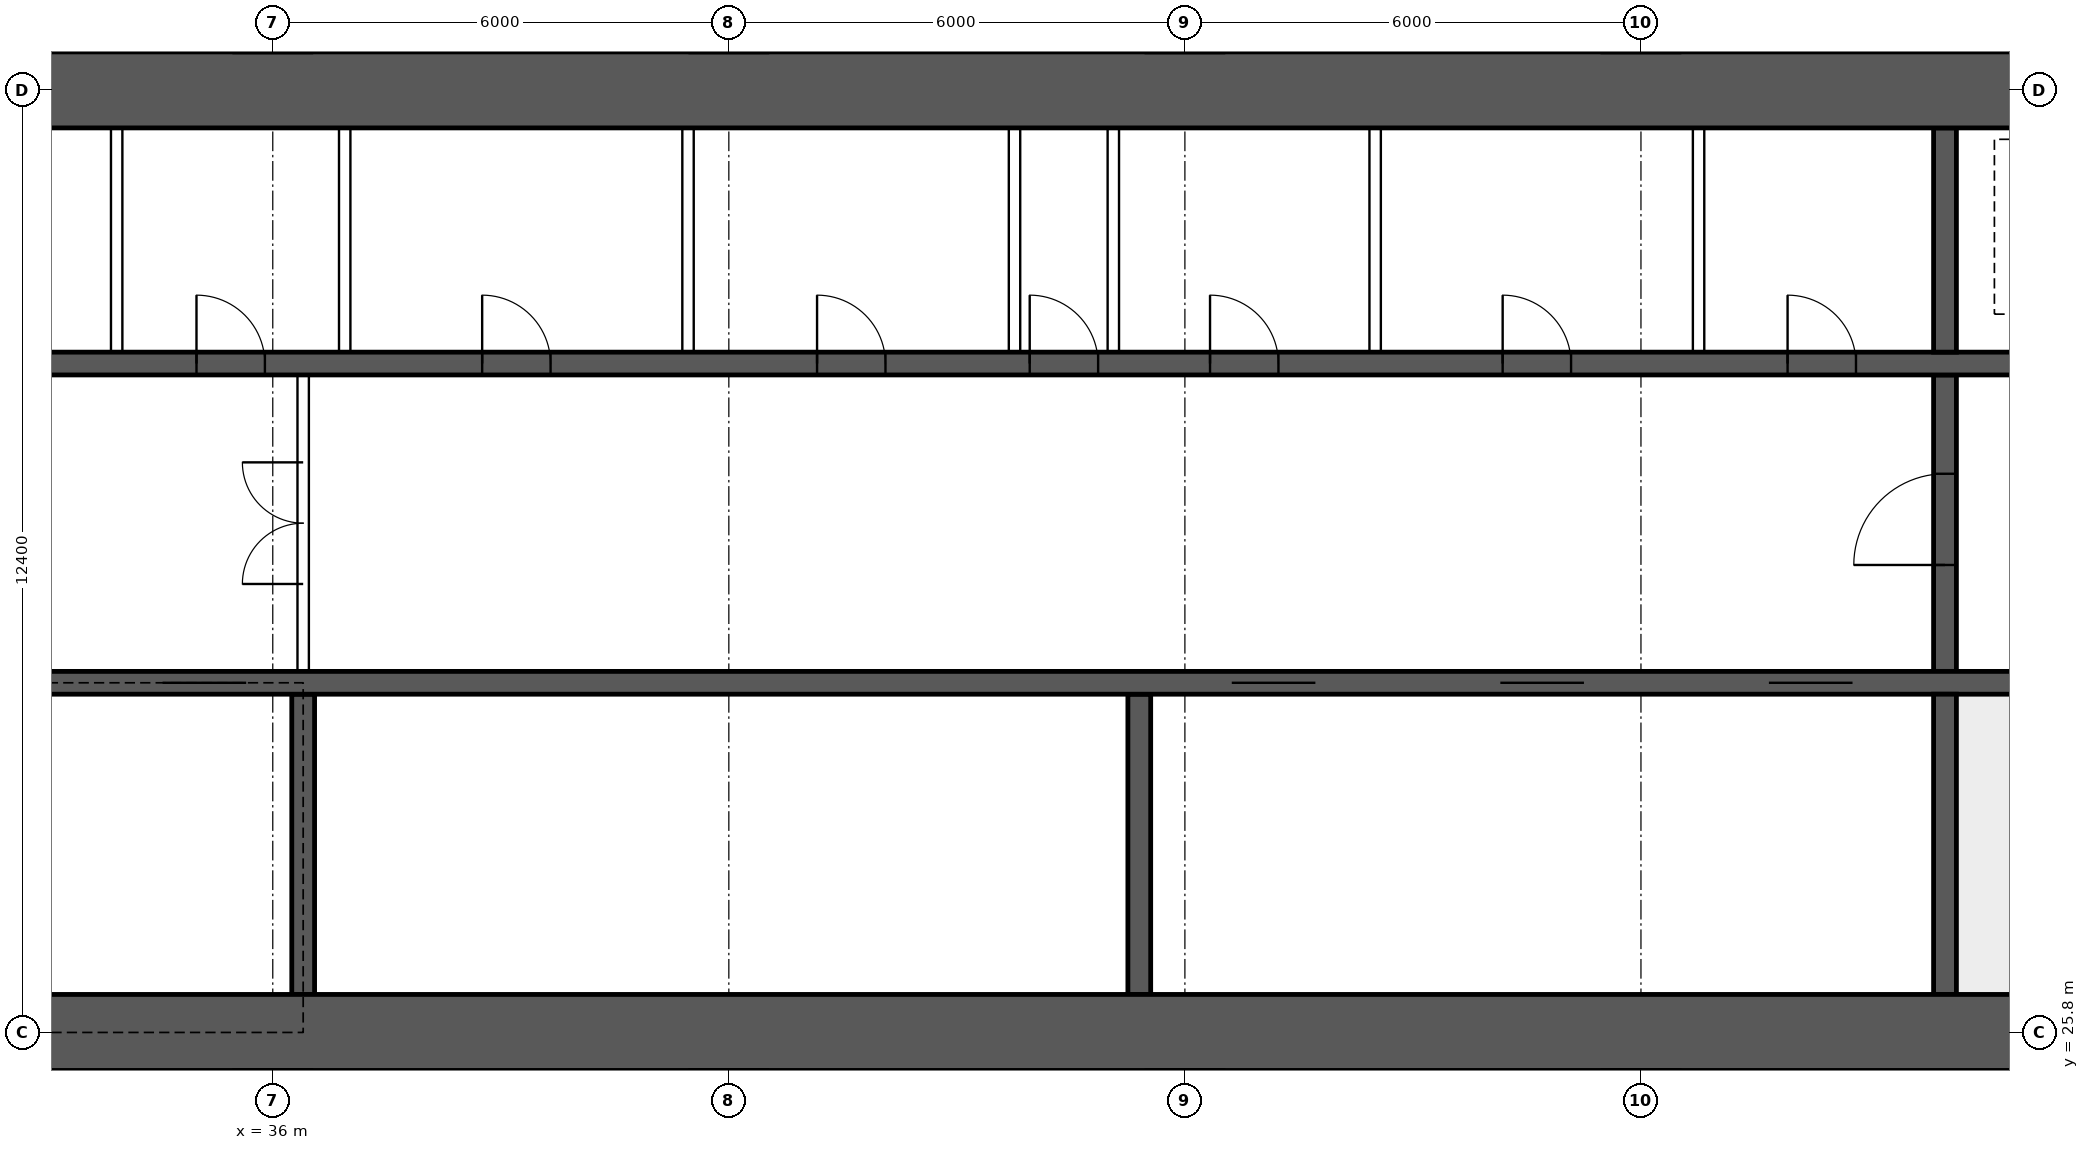
"""IFC4 building model, lengths in metres.
Left out: names, types, materials, properties, quantities, classifications, styles, units other than length and angle.
Written with IfcOpenShell. Run it as: python <this file> out.ifc"""

import sys

from ifc_helpers import new_model, si_unit, direction, frame, frame_2d, origin, place, context, subcontext, project, spatial, rectangle, extrude, element, fill, save


model = new_model("IFC4")
c1 = context("Model", 3, precision=1e-05, world=origin(), true_north=direction((0.0, 1.0)))
c2 = subcontext(c1, "Body", "Model", "MODEL_VIEW")
j1 = project(units=[si_unit("LENGTHUNIT", "METRE"), si_unit("PLANEANGLEUNIT", "RADIAN")], contexts=[c1])
p1 = place(None, origin())
s1 = spatial("IfcSite", under=j1, at=p1, CompositionType="ELEMENT")
p2 = place(p1, origin())
s2 = spatial("IfcBuilding", under=s1, at=p2, CompositionType="ELEMENT")
p3 = place(p2, frame((0.0, 0.0, 65.2)))
s3 = spatial("IfcBuildingStorey", under=s2, at=p3, CompositionType="ELEMENT", Elevation=65.2)
for number, where, z_axis, x_axis in (
    (1, (18.0, 25.8, 0.0), (0.0, 0.0, 1.0), (1.0, 0.0, 0.0)),
    (2, (18.0, 38.2, 0.0), (0.0, 0.0, 1.0), (1.0, 0.0, 0.0)),
):
    element("IfcWall", number, at=place(p3, frame(where, z_axis=z_axis, x_axis=x_axis)), inside=s3, PredefinedType="SHEAR", context=c2, shape_type="SweptSolid", body=[
        extrude(rectangle(XDim=48.0, YDim=1.0, at=frame_2d((24.0, 0.0))), origin(), (0.0, 0.0, 1.0), 3.75),
    ])
p4 = place(p3, frame((18.5, 30.4, 0.0), z_axis=(0.0, 0.0, 1.0), x_axis=(1.0, 0.0, 0.0)))
e3 = element("IfcWall", 3, at=p4, inside=s3, PredefinedType="SHEAR", context=c2, shape_type="SweptSolid", body=[
    extrude(rectangle(XDim=47.0, YDim=0.3, at=frame_2d((23.5, 0.0))), origin(), (0.0, 0.0, 1.0), 3.75),
])
p5 = place(p4, frame((0.4, 0.0, 0.0)))
e4 = element("IfcOpeningElement", 4, at=p5, cuts=e3, PredefinedType="OPENING", context=c2, shape_type="SweptSolid", body=[
    extrude(rectangle(XDim=1.0, YDim=2.1, at=frame_2d((0.5, 1.05))), frame((0.0, 0.16, 0.0), z_axis=(0.0, -1.0, 0.0), x_axis=(1.0, 0.0, 0.0)), (0.0, 0.0, 1.0), 0.32),
])
p6 = place(p4, frame((45.6, 0.0, 0.0)))
e5 = element("IfcOpeningElement", 5, at=p6, cuts=e3, PredefinedType="OPENING", context=c2, shape_type="SweptSolid", body=[
    extrude(rectangle(XDim=1.0, YDim=2.1, at=frame_2d((0.5, 1.05))), frame((0.0, 0.16, 0.0), z_axis=(0.0, -1.0, 0.0), x_axis=(1.0, 0.0, 0.0)), (0.0, 0.0, 1.0), 0.32),
])
p7 = place(p4, frame((8.25, 0.0, 0.0)))
e6 = element("IfcOpeningElement", 6, at=p7, cuts=e3, PredefinedType="OPENING", context=c2, shape_type="SweptSolid", body=[
    extrude(rectangle(XDim=1.1, YDim=2.1, at=frame_2d((0.55, 1.05))), frame((0.0, 0.16, 0.0), z_axis=(0.0, -1.0, 0.0), x_axis=(1.0, 0.0, 0.0)), (0.0, 0.0, 1.0), 0.32),
])
p8 = place(p4, frame((10.85, 0.0, 0.0)))
e7 = element("IfcOpeningElement", 7, at=p8, cuts=e3, PredefinedType="OPENING", context=c2, shape_type="SweptSolid", body=[
    extrude(rectangle(XDim=1.1, YDim=2.1, at=frame_2d((0.55, 1.05))), frame((0.0, 0.16, 0.0), z_axis=(0.0, -1.0, 0.0), x_axis=(1.0, 0.0, 0.0)), (0.0, 0.0, 1.0), 0.32),
])
p9 = place(p4, frame((13.45, 0.0, 0.0)))
e8 = element("IfcOpeningElement", 8, at=p9, cuts=e3, PredefinedType="OPENING", context=c2, shape_type="SweptSolid", body=[
    extrude(rectangle(XDim=1.1, YDim=2.1, at=frame_2d((0.55, 1.05))), frame((0.0, 0.16, 0.0), z_axis=(0.0, -1.0, 0.0), x_axis=(1.0, 0.0, 0.0)), (0.0, 0.0, 1.0), 0.32),
])
p10 = place(p4, frame((16.05, 0.0, 0.0)))
e9 = element("IfcOpeningElement", 9, at=p10, cuts=e3, PredefinedType="OPENING", context=c2, shape_type="SweptSolid", body=[
    extrude(rectangle(XDim=1.1, YDim=2.1, at=frame_2d((0.55, 1.05))), frame((0.0, 0.16, 0.0), z_axis=(0.0, -1.0, 0.0), x_axis=(1.0, 0.0, 0.0)), (0.0, 0.0, 1.0), 0.32),
])
p11 = place(p4, frame((30.117, 0.0, 0.0)))
e10 = element("IfcOpeningElement", 10, at=p11, cuts=e3, PredefinedType="OPENING", context=c2, shape_type="SweptSolid", body=[
    extrude(rectangle(XDim=1.1, YDim=2.1, at=frame_2d((0.55, 1.05))), frame((0.0, 0.16, 0.0), z_axis=(0.0, -1.0, 0.0), x_axis=(1.0, 0.0, 0.0)), (0.0, 0.0, 1.0), 0.32),
])
p12 = place(p4, frame((33.65, 0.0, 0.0)))
e11 = element("IfcOpeningElement", 11, at=p12, cuts=e3, PredefinedType="OPENING", context=c2, shape_type="SweptSolid", body=[
    extrude(rectangle(XDim=1.1, YDim=2.1, at=frame_2d((0.55, 1.05))), frame((0.0, 0.16, 0.0), z_axis=(0.0, -1.0, 0.0), x_axis=(1.0, 0.0, 0.0)), (0.0, 0.0, 1.0), 0.32),
])
p13 = place(p4, frame((37.183, 0.0, 0.0)))
e12 = element("IfcOpeningElement", 12, at=p13, cuts=e3, PredefinedType="OPENING", context=c2, shape_type="SweptSolid", body=[
    extrude(rectangle(XDim=1.1, YDim=2.1, at=frame_2d((0.55, 1.05))), frame((0.0, 0.16, 0.0), z_axis=(0.0, -1.0, 0.0), x_axis=(1.0, 0.0, 0.0)), (0.0, 0.0, 1.0), 0.32),
])
p14 = place(p3, frame((18.5, 34.6, 0.0), z_axis=(0.0, 0.0, 1.0), x_axis=(1.0, 0.0, 0.0)))
e13 = element("IfcWall", 13, at=p14, inside=s3, PredefinedType="SHEAR", context=c2, shape_type="SweptSolid", body=[
    extrude(rectangle(XDim=47.0, YDim=0.3, at=frame_2d((23.5, 0.0))), origin(), (0.0, 0.0, 1.0), 3.75),
])
p15 = place(p14, frame((0.9, 0.0, 0.0)))
e14 = element("IfcOpeningElement", 14, at=p15, cuts=e13, PredefinedType="OPENING", context=c2, shape_type="SweptSolid", body=[
    extrude(rectangle(XDim=1.1, YDim=2.1, at=frame_2d((0.55, 1.05))), frame((0.0, 0.16, 0.0), z_axis=(0.0, -1.0, 0.0), x_axis=(1.0, 0.0, 0.0)), (0.0, 0.0, 1.0), 0.32),
])
p16 = place(p14, frame((45.0, 0.0, 0.0)))
e15 = element("IfcOpeningElement", 15, at=p16, cuts=e13, PredefinedType="OPENING", context=c2, shape_type="SweptSolid", body=[
    extrude(rectangle(XDim=1.1, YDim=2.1, at=frame_2d((0.55, 1.05))), frame((0.0, 0.16, 0.0), z_axis=(0.0, -1.0, 0.0), x_axis=(1.0, 0.0, 0.0)), (0.0, 0.0, 1.0), 0.32),
])
p17 = place(p14, frame((4.1, 0.0, 0.0)))
e16 = element("IfcOpeningElement", 16, at=p17, cuts=e13, PredefinedType="OPENING", context=c2, shape_type="SweptSolid", body=[
    extrude(rectangle(XDim=0.9, YDim=2.1, at=frame_2d((0.45, 1.05))), frame((0.0, 0.16, 0.0), z_axis=(0.0, -1.0, 0.0), x_axis=(1.0, 0.0, 0.0)), (0.0, 0.0, 1.0), 0.32),
])
p18 = place(p14, frame((42.0, 0.0, 0.0)))
e17 = element("IfcOpeningElement", 17, at=p18, cuts=e13, PredefinedType="OPENING", context=c2, shape_type="SweptSolid", body=[
    extrude(rectangle(XDim=0.9, YDim=2.1, at=frame_2d((0.45, 1.05))), frame((0.0, 0.16, 0.0), z_axis=(0.0, -1.0, 0.0), x_axis=(1.0, 0.0, 0.0)), (0.0, 0.0, 1.0), 0.32),
])
p19 = place(p14, frame((8.875, 0.0, 0.0)))
e18 = element("IfcOpeningElement", 18, at=p19, cuts=e13, PredefinedType="OPENING", context=c2, shape_type="SweptSolid", body=[
    extrude(rectangle(XDim=0.9, YDim=2.1, at=frame_2d((0.45, 1.05))), frame((0.0, 0.16, 0.0), z_axis=(0.0, -1.0, 0.0), x_axis=(1.0, 0.0, 0.0)), (0.0, 0.0, 1.0), 0.32),
])
p20 = place(p14, frame((12.849, 0.0, 0.0)))
e19 = element("IfcOpeningElement", 19, at=p20, cuts=e13, PredefinedType="OPENING", context=c2, shape_type="SweptSolid", body=[
    extrude(rectangle(XDim=0.9, YDim=2.1, at=frame_2d((0.45, 1.05))), frame((0.0, 0.16, 0.0), z_axis=(0.0, -1.0, 0.0), x_axis=(1.0, 0.0, 0.0)), (0.0, 0.0, 1.0), 0.32),
])
p21 = place(p14, frame((16.496, 0.0, 0.0)))
e20 = element("IfcOpeningElement", 20, at=p21, cuts=e13, PredefinedType="OPENING", context=c2, shape_type="SweptSolid", body=[
    extrude(rectangle(XDim=0.9, YDim=2.1, at=frame_2d((0.45, 1.05))), frame((0.0, 0.16, 0.0), z_axis=(0.0, -1.0, 0.0), x_axis=(1.0, 0.0, 0.0)), (0.0, 0.0, 1.0), 0.32),
])
p22 = place(p14, frame((20.255, 0.0, 0.0)))
e21 = element("IfcOpeningElement", 21, at=p22, cuts=e13, PredefinedType="OPENING", context=c2, shape_type="SweptSolid", body=[
    extrude(rectangle(XDim=0.9, YDim=2.1, at=frame_2d((0.45, 1.05))), frame((0.0, 0.16, 0.0), z_axis=(0.0, -1.0, 0.0), x_axis=(1.0, 0.0, 0.0)), (0.0, 0.0, 1.0), 0.32),
])
p23 = place(p14, frame((24.661, 0.0, 0.0)))
e22 = element("IfcOpeningElement", 22, at=p23, cuts=e13, PredefinedType="OPENING", context=c2, shape_type="SweptSolid", body=[
    extrude(rectangle(XDim=0.9, YDim=2.1, at=frame_2d((0.45, 1.05))), frame((0.0, 0.16, 0.0), z_axis=(0.0, -1.0, 0.0), x_axis=(1.0, 0.0, 0.0)), (0.0, 0.0, 1.0), 0.32),
])
p24 = place(p14, frame((27.458, 0.0, 0.0)))
e23 = element("IfcOpeningElement", 23, at=p24, cuts=e13, PredefinedType="OPENING", context=c2, shape_type="SweptSolid", body=[
    extrude(rectangle(XDim=0.9, YDim=2.1, at=frame_2d((0.45, 1.05))), frame((0.0, 0.16, 0.0), z_axis=(0.0, -1.0, 0.0), x_axis=(1.0, 0.0, 0.0)), (0.0, 0.0, 1.0), 0.32),
])
p25 = place(p14, frame((29.831, 0.0, 0.0)))
e24 = element("IfcOpeningElement", 24, at=p25, cuts=e13, PredefinedType="OPENING", context=c2, shape_type="SweptSolid", body=[
    extrude(rectangle(XDim=0.9, YDim=2.1, at=frame_2d((0.45, 1.05))), frame((0.0, 0.16, 0.0), z_axis=(0.0, -1.0, 0.0), x_axis=(1.0, 0.0, 0.0)), (0.0, 0.0, 1.0), 0.32),
])
p26 = place(p14, frame((33.68, 0.0, 0.0)))
e25 = element("IfcOpeningElement", 25, at=p26, cuts=e13, PredefinedType="OPENING", context=c2, shape_type="SweptSolid", body=[
    extrude(rectangle(XDim=0.9, YDim=2.1, at=frame_2d((0.45, 1.05))), frame((0.0, 0.16, 0.0), z_axis=(0.0, -1.0, 0.0), x_axis=(1.0, 0.0, 0.0)), (0.0, 0.0, 1.0), 0.32),
])
p27 = place(p14, frame((37.429, 0.0, 0.0)))
e26 = element("IfcOpeningElement", 26, at=p27, cuts=e13, PredefinedType="OPENING", context=c2, shape_type="SweptSolid", body=[
    extrude(rectangle(XDim=0.9, YDim=2.1, at=frame_2d((0.45, 1.05))), frame((0.0, 0.16, 0.0), z_axis=(0.0, -1.0, 0.0), x_axis=(1.0, 0.0, 0.0)), (0.0, 0.0, 1.0), 0.32),
])
p28 = place(p3, frame((58.0, 26.3, 0.0), z_axis=(0.0, 0.0, 1.0), x_axis=(0.0, 1.0, 0.0)))
e27 = element("IfcWall", 27, at=p28, inside=s3, PredefinedType="SHEAR", context=c2, shape_type="SweptSolid", body=[
    extrude(rectangle(XDim=3.95, YDim=0.3, at=frame_2d((1.975, 0.0))), origin(), (0.0, 0.0, 1.0), 3.75),
])
p29 = place(p3, frame((58.0, 30.55, 0.0), z_axis=(0.0, 0.0, 1.0), x_axis=(0.0, 1.0, 0.0)))
e28 = element("IfcWall", 28, at=p29, inside=s3, PredefinedType="SHEAR", context=c2, shape_type="SweptSolid", body=[
    extrude(rectangle(XDim=3.9, YDim=0.3, at=frame_2d((1.95, 0.0))), origin(), (0.0, 0.0, 1.0), 3.75),
])
p30 = place(p29, frame((1.4, 0.0, 0.0)))
e29 = element("IfcOpeningElement", 29, at=p30, cuts=e28, PredefinedType="OPENING", context=c2, shape_type="SweptSolid", body=[
    extrude(rectangle(XDim=1.2, YDim=2.1, at=frame_2d((0.6, 1.05))), frame((0.0, 0.16, 0.0), z_axis=(0.0, -1.0, 0.0), x_axis=(1.0, 0.0, 0.0)), (0.0, 0.0, 1.0), 0.32),
])
p31 = place(p3, frame((58.0, 34.75, 0.0), z_axis=(0.0, 0.0, 1.0), x_axis=(0.0, 1.0, 0.0)))
e30 = element("IfcWall", 30, at=p31, inside=s3, PredefinedType="SHEAR", context=c2, shape_type="SweptSolid", body=[
    extrude(rectangle(XDim=2.95, YDim=0.3, at=frame_2d((1.475, 0.0))), origin(), (0.0, 0.0, 1.0), 3.75),
])
for number, where, z_axis, x_axis in (
    (31, (36.4, 26.3, 0.0), (0.0, 0.0, 1.0), (0.0, 1.0, 0.0)),
    (32, (47.4, 26.3, 0.0), (0.0, 0.0, 1.0), (0.0, 1.0, 0.0)),
):
    element("IfcWall", number, at=place(p3, frame(where, z_axis=z_axis, x_axis=x_axis)), inside=s3, PredefinedType="SHEAR", context=c2, shape_type="SweptSolid", body=[
        extrude(rectangle(XDim=3.95, YDim=0.3, at=frame_2d((1.975, 0.0))), origin(), (0.0, 0.0, 1.0), 3.75),
    ])
p32 = place(p3, frame((36.4, 30.55, 0.0), z_axis=(0.0, 0.0, 1.0), x_axis=(0.0, 1.0, 0.0)))
e33 = element("IfcWall", 33, at=p32, inside=s3, PredefinedType="SOLIDWALL", context=c2, shape_type="SweptSolid", body=[
    extrude(rectangle(XDim=3.9, YDim=0.15, at=frame_2d((1.95, 0.0))), origin(), (0.0, 0.0, 1.0), 3.4),
])
p33 = place(p32, frame((1.15, 0.0, 0.0)))
e34 = element("IfcOpeningElement", 34, at=p33, cuts=e33, PredefinedType="OPENING", context=c2, shape_type="SweptSolid", body=[
    extrude(rectangle(XDim=1.6, YDim=2.1, at=frame_2d((0.8, 1.05))), frame((0.0, 0.085, 0.0), z_axis=(0.0, -1.0, 0.0), x_axis=(1.0, 0.0, 0.0)), (0.0, 0.0, 1.0), 0.17),
])
for number, where, z_axis, x_axis in (
    (35, (33.946, 34.75, 0.0), (0.0, 0.0, 1.0), (0.0, 1.0, 0.0)),
    (36, (36.946, 34.75, 0.0), (0.0, 0.0, 1.0), (0.0, 1.0, 0.0)),
    (37, (41.463, 34.75, 0.0), (0.0, 0.0, 1.0), (0.0, 1.0, 0.0)),
    (38, (45.758, 34.75, 0.0), (0.0, 0.0, 1.0), (0.0, 1.0, 0.0)),
    (39, (47.058, 34.75, 0.0), (0.0, 0.0, 1.0), (0.0, 1.0, 0.0)),
    (40, (50.503, 34.75, 0.0), (0.0, 0.0, 1.0), (0.0, 1.0, 0.0)),
    (41, (54.758, 34.75, 0.0), (0.0, 0.0, 1.0), (0.0, 1.0, 0.0)),
):
    element("IfcWall", number, at=place(p3, frame(where, z_axis=z_axis, x_axis=x_axis)), inside=s3, PredefinedType="SOLIDWALL", context=c2, shape_type="SweptSolid", body=[
        extrude(rectangle(XDim=2.95, YDim=0.15, at=frame_2d((1.475, 0.0))), origin(), (0.0, 0.0, 1.0), 3.4),
    ])
for number, where, z_axis, x_axis in (
    (42, (45.595, 14.9, 0.0), (0.0, 0.0, 1.0), (0.0, 1.0, 0.0)),
    (43, (57.185, 14.9, 0.0), (0.0, 0.0, 1.0), (0.0, 1.0, 0.0)),
):
    element("IfcWall", number, at=place(p3, frame(where, z_axis=z_axis, x_axis=x_axis)), inside=s3, PredefinedType="PARTITIONING", context=c2, shape_type="SweptSolid", body=[
        extrude(rectangle(XDim=10.4, YDim=0.15, at=frame_2d((5.2, 0.0))), origin(), (0.0, 0.0, 1.0), 3.4),
    ])
p34 = place(p33, origin())
e44 = element("IfcDoor", 44, at=p34, inside=s3, OperationType="DOUBLE_DOOR_SINGLE_SWING", PredefinedType="DOOR", context=c2, shape_type="SweptSolid", body=[
    extrude(rectangle(XDim=1.6, YDim=2.1, at=frame_2d((0.8, 1.05))), frame((0.0, 0.025, 0.0), z_axis=(0.0, -1.0, 0.0), x_axis=(1.0, 0.0, 0.0)), (0.0, 0.0, 1.0), 0.05),
])
fill(e34, e44)
p35 = place(p30, origin())
e45 = element("IfcDoor", 45, at=p35, inside=s3, OperationType="SINGLE_SWING_LEFT", PredefinedType="DOOR", context=c2, shape_type="SweptSolid", body=[
    extrude(rectangle(XDim=1.2, YDim=2.1, at=frame_2d((0.6, 1.05))), frame((0.0, 0.025, 0.0), z_axis=(0.0, -1.0, 0.0), x_axis=(1.0, 0.0, 0.0)), (0.0, 0.0, 1.0), 0.05),
])
fill(e29, e45)
p36 = place(p21, origin())
e46 = element("IfcDoor", 46, at=p36, inside=s3, OperationType="SINGLE_SWING_LEFT", PredefinedType="DOOR", context=c2, shape_type="SweptSolid", body=[
    extrude(rectangle(XDim=0.9, YDim=2.1, at=frame_2d((0.45, 1.05))), frame((0.0, 0.025, 0.0), z_axis=(0.0, -1.0, 0.0), x_axis=(1.0, 0.0, 0.0)), (0.0, 0.0, 1.0), 0.05),
])
fill(e20, e46)
p37 = place(p22, origin())
e47 = element("IfcDoor", 47, at=p37, inside=s3, OperationType="SINGLE_SWING_LEFT", PredefinedType="DOOR", context=c2, shape_type="SweptSolid", body=[
    extrude(rectangle(XDim=0.9, YDim=2.1, at=frame_2d((0.45, 1.05))), frame((0.0, 0.025, 0.0), z_axis=(0.0, -1.0, 0.0), x_axis=(1.0, 0.0, 0.0)), (0.0, 0.0, 1.0), 0.05),
])
fill(e21, e47)
p38 = place(p23, origin())
e48 = element("IfcDoor", 48, at=p38, inside=s3, OperationType="SINGLE_SWING_LEFT", PredefinedType="DOOR", context=c2, shape_type="SweptSolid", body=[
    extrude(rectangle(XDim=0.9, YDim=2.1, at=frame_2d((0.45, 1.05))), frame((0.0, 0.025, 0.0), z_axis=(0.0, -1.0, 0.0), x_axis=(1.0, 0.0, 0.0)), (0.0, 0.0, 1.0), 0.05),
])
fill(e22, e48)
p39 = place(p24, origin())
e49 = element("IfcDoor", 49, at=p39, inside=s3, OperationType="SINGLE_SWING_LEFT", PredefinedType="DOOR", context=c2, shape_type="SweptSolid", body=[
    extrude(rectangle(XDim=0.9, YDim=2.1, at=frame_2d((0.45, 1.05))), frame((0.0, 0.025, 0.0), z_axis=(0.0, -1.0, 0.0), x_axis=(1.0, 0.0, 0.0)), (0.0, 0.0, 1.0), 0.05),
])
fill(e23, e49)
p40 = place(p25, origin())
e50 = element("IfcDoor", 50, at=p40, inside=s3, OperationType="SINGLE_SWING_LEFT", PredefinedType="DOOR", context=c2, shape_type="SweptSolid", body=[
    extrude(rectangle(XDim=0.9, YDim=2.1, at=frame_2d((0.45, 1.05))), frame((0.0, 0.025, 0.0), z_axis=(0.0, -1.0, 0.0), x_axis=(1.0, 0.0, 0.0)), (0.0, 0.0, 1.0), 0.05),
])
fill(e24, e50)
p41 = place(p26, origin())
e51 = element("IfcDoor", 51, at=p41, inside=s3, OperationType="SINGLE_SWING_LEFT", PredefinedType="DOOR", context=c2, shape_type="SweptSolid", body=[
    extrude(rectangle(XDim=0.9, YDim=2.1, at=frame_2d((0.45, 1.05))), frame((0.0, 0.025, 0.0), z_axis=(0.0, -1.0, 0.0), x_axis=(1.0, 0.0, 0.0)), (0.0, 0.0, 1.0), 0.05),
])
fill(e25, e51)
p42 = place(p27, origin())
e52 = element("IfcDoor", 52, at=p42, inside=s3, OperationType="SINGLE_SWING_LEFT", PredefinedType="DOOR", context=c2, shape_type="SweptSolid", body=[
    extrude(rectangle(XDim=0.9, YDim=2.1, at=frame_2d((0.45, 1.05))), frame((0.0, 0.025, 0.0), z_axis=(0.0, -1.0, 0.0), x_axis=(1.0, 0.0, 0.0)), (0.0, 0.0, 1.0), 0.05),
])
fill(e26, e52)
p43 = place(p10, origin())
e53 = element("IfcDoor", 53, at=p43, inside=s3, OperationType="DOUBLE_DOOR_SLIDING", PredefinedType="DOOR", context=c2, shape_type="SweptSolid", body=[
    extrude(rectangle(XDim=1.1, YDim=2.1, at=frame_2d((0.55, 1.05))), frame((0.0, 0.025, 0.0), z_axis=(0.0, -1.0, 0.0), x_axis=(1.0, 0.0, 0.0)), (0.0, 0.0, 1.0), 0.05),
])
fill(e9, e53)
p44 = place(p11, origin())
e54 = element("IfcDoor", 54, at=p44, inside=s3, OperationType="DOUBLE_DOOR_SLIDING", PredefinedType="DOOR", context=c2, shape_type="SweptSolid", body=[
    extrude(rectangle(XDim=1.1, YDim=2.1, at=frame_2d((0.55, 1.05))), frame((0.0, 0.025, 0.0), z_axis=(0.0, -1.0, 0.0), x_axis=(1.0, 0.0, 0.0)), (0.0, 0.0, 1.0), 0.05),
])
fill(e10, e54)
p45 = place(p12, origin())
e55 = element("IfcDoor", 55, at=p45, inside=s3, OperationType="DOUBLE_DOOR_SLIDING", PredefinedType="DOOR", context=c2, shape_type="SweptSolid", body=[
    extrude(rectangle(XDim=1.1, YDim=2.1, at=frame_2d((0.55, 1.05))), frame((0.0, 0.025, 0.0), z_axis=(0.0, -1.0, 0.0), x_axis=(1.0, 0.0, 0.0)), (0.0, 0.0, 1.0), 0.05),
])
fill(e11, e55)
p46 = place(p13, origin())
e56 = element("IfcDoor", 56, at=p46, inside=s3, OperationType="DOUBLE_DOOR_SLIDING", PredefinedType="DOOR", context=c2, shape_type="SweptSolid", body=[
    extrude(rectangle(XDim=1.1, YDim=2.1, at=frame_2d((0.55, 1.05))), frame((0.0, 0.025, 0.0), z_axis=(0.0, -1.0, 0.0), x_axis=(1.0, 0.0, 0.0)), (0.0, 0.0, 1.0), 0.05),
])
fill(e12, e56)
save(model, sys.argv[1])
